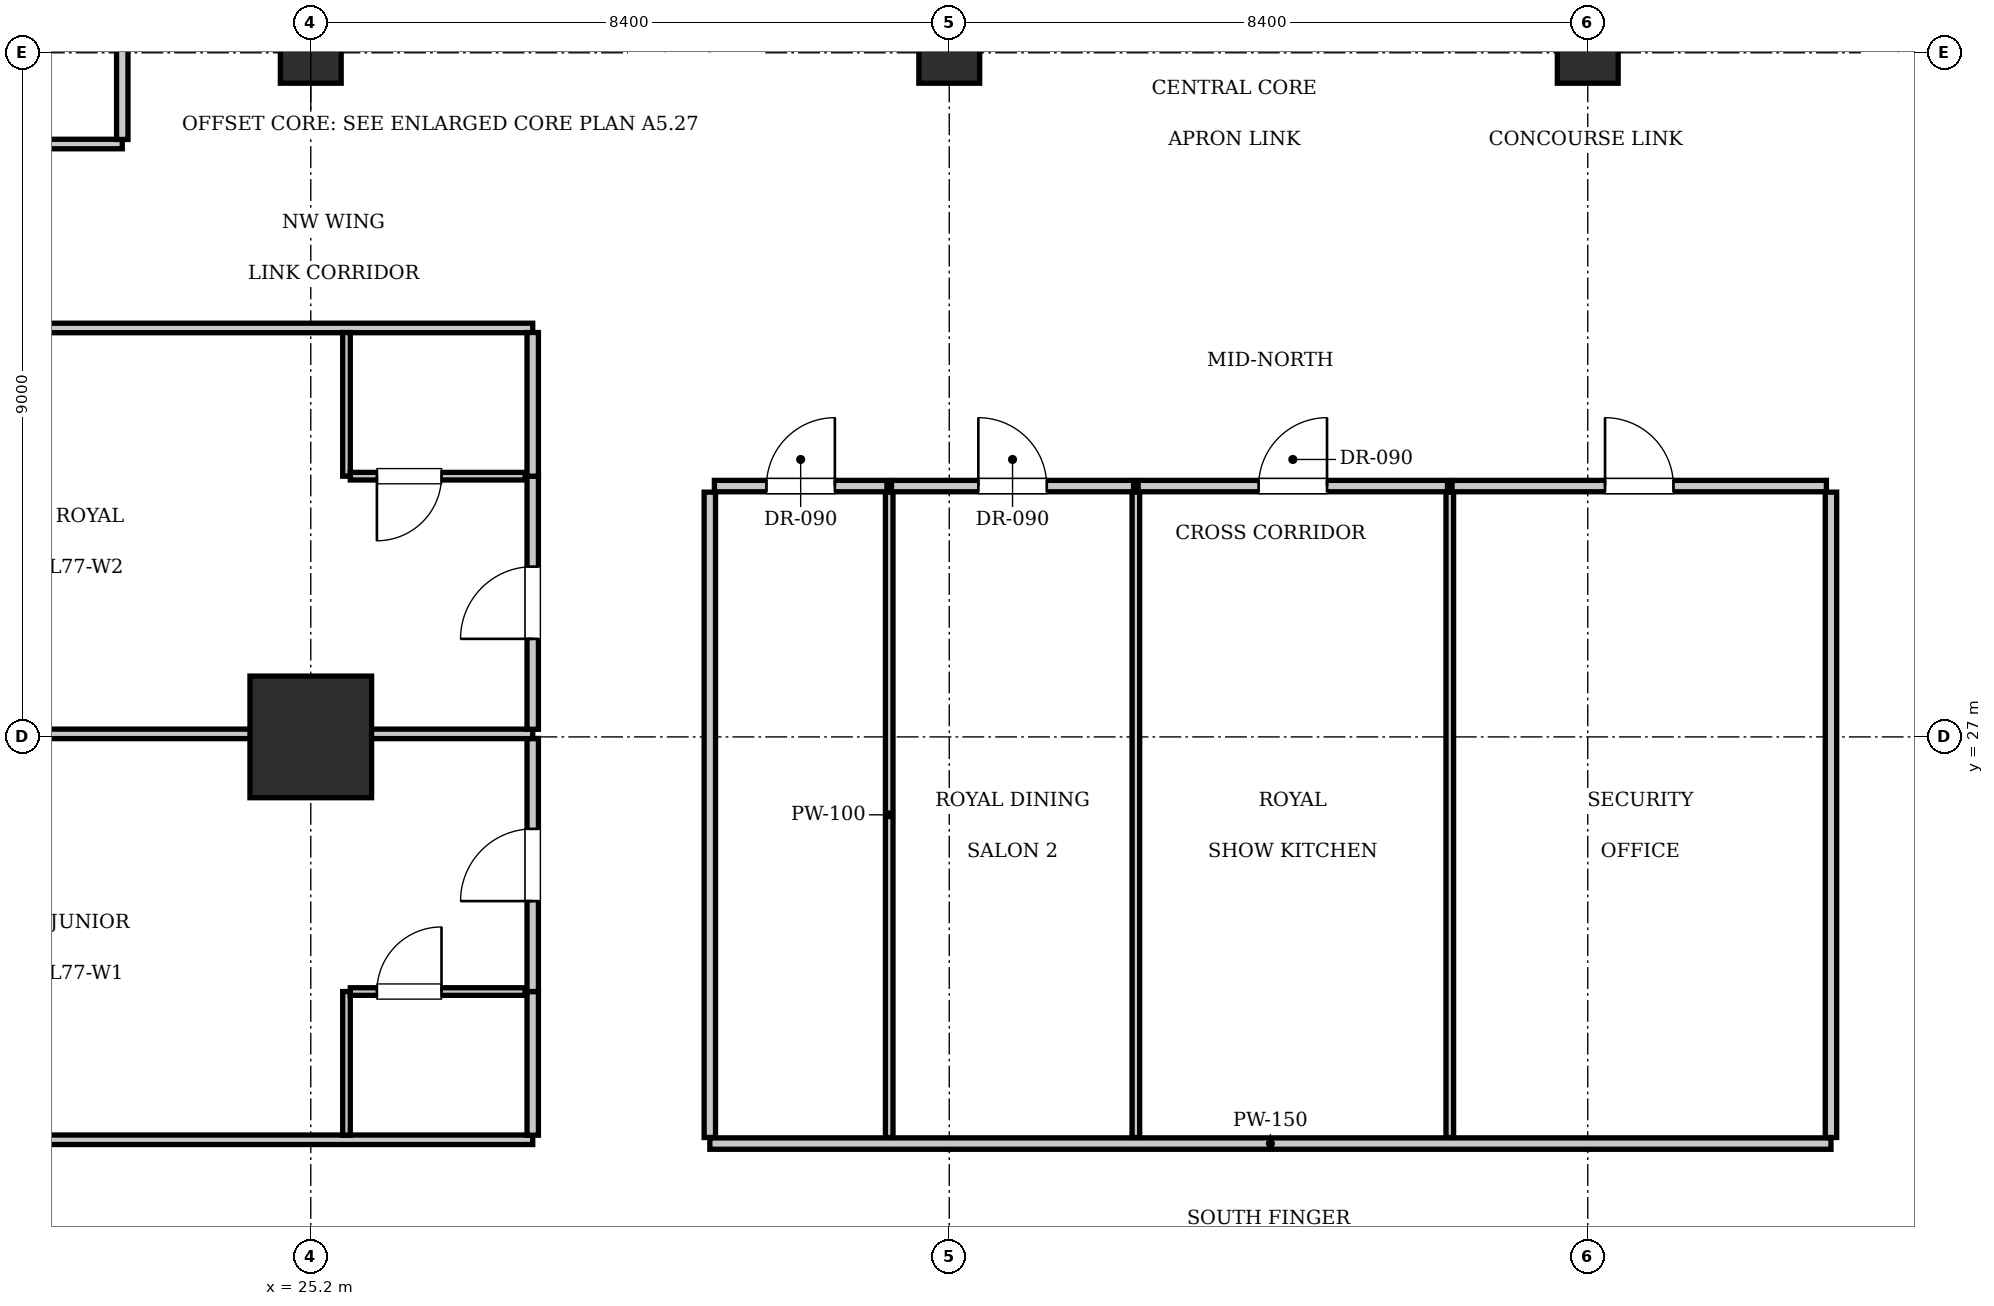
"""IFC4 building model, lengths in metres.
Left out: names, types, materials, properties, quantities, classifications, styles, units other than length and angle.
Written with IfcOpenShell. Run it as: python <this file> out.ifc"""

import sys

from ifc_helpers import new_model, si_unit, direction, frame, frame_2d, origin, origin_2d, place, context, subcontext, project, spatial, rectangle, extrude, element, fill, save


model = new_model("IFC4")
c1 = context("Model", 3, precision=1e-05, world=origin(), true_north=direction((0.0, 1.0)))
c2 = subcontext(c1, "Body", "Model", "MODEL_VIEW")
j1 = project(units=[si_unit("LENGTHUNIT", "METRE"), si_unit("PLANEANGLEUNIT", "RADIAN")], contexts=[c1])
p1 = place(None, origin())
s1 = spatial("IfcSite", under=j1, at=p1, CompositionType="ELEMENT")
p2 = place(p1, origin())
s2 = spatial("IfcBuilding", under=s1, at=p2, CompositionType="ELEMENT")
p3 = place(p2, frame((0.0, 0.0, 312.55)))
s3 = spatial("IfcBuildingStorey", under=s2, at=p3, CompositionType="ELEMENT", Elevation=312.55)
p4 = place(p3, frame((25.2, 27.0, 0.0), z_axis=(0.0, 0.0, 1.0), x_axis=(1.0, 0.0, 0.0)))
e1 = element("IfcColumn", 1, at=p4, inside=s3, PredefinedType="COLUMN", context=c2, shape_type="SweptSolid", body=[
    extrude(rectangle(XDim=1.6, YDim=1.6, at=origin_2d()), origin(), (0.0, 0.0, 1.0), 3.85),
])
for number, where, z_axis, x_axis in (
    (2, (25.2, 36.0, 0.0), (0.0, 0.0, 1.0), (1.0, 0.0, 0.0)),
    (3, (33.6, 36.0, 0.0), (0.0, 0.0, 1.0), (1.0, 0.0, 0.0)),
    (4, (42.0, 36.0, 0.0), (0.0, 0.0, 1.0), (1.0, 0.0, 0.0)),
):
    element("IfcColumn", number, at=place(p3, frame(where, z_axis=z_axis, x_axis=x_axis)), inside=s3, PredefinedType="COLUMN", context=c2, shape_type="SweptSolid", body=[
        extrude(rectangle(XDim=0.8, YDim=0.8, at=origin_2d()), origin(), (0.0, 0.0, 1.0), 3.85),
    ])
p5 = place(p3, frame((30.45, 21.65, 0.0), z_axis=(0.0, 0.0, 1.0), x_axis=(1.0, 0.0, 0.0)))
e5 = element("IfcWall", 5, at=p5, inside=s3, PredefinedType="PARTITIONING", context=c2, shape_type="SweptSolid", body=[
    extrude(rectangle(XDim=14.75, YDim=0.15, at=frame_2d((7.375, 0.0))), origin(), (0.0, 0.0, 1.0), 3.55),
])
for number, where, z_axis, x_axis in (
    (6, (30.45, 21.73, 0.0), (0.0, 0.0, 1.0), (0.0, 1.0, 0.0)),
    (7, (45.2, 21.73, 0.0), (0.0, 0.0, 1.0), (0.0, 1.0, 0.0)),
):
    element("IfcWall", number, at=place(p3, frame(where, z_axis=z_axis, x_axis=x_axis)), inside=s3, PredefinedType="PARTITIONING", context=c2, shape_type="SweptSolid", body=[
        extrude(rectangle(XDim=8.49, YDim=0.15, at=frame_2d((4.245, 0.0))), origin(), (0.0, 0.0, 1.0), 3.55),
    ])
p6 = place(p3, frame((30.51, 30.3, 0.0), z_axis=(0.0, 0.0, 1.0), x_axis=(1.0, 0.0, 0.0)))
e8 = element("IfcWall", 8, at=p6, inside=s3, PredefinedType="PARTITIONING", context=c2, shape_type="SweptSolid", body=[
    extrude(rectangle(XDim=2.27, YDim=0.15, at=frame_2d((1.135, 0.0))), origin(), (0.0, 0.0, 1.0), 3.55),
])
p7 = place(p6, frame((0.685, 0.0, 0.0)))
e9 = element("IfcOpeningElement", 9, at=p7, cuts=e8, PredefinedType="OPENING", context=c2, shape_type="SweptSolid", body=[
    extrude(rectangle(XDim=0.9, YDim=2.1, at=frame_2d((0.45, 1.05))), frame((0.0, 0.085, 0.0), z_axis=(0.0, -1.0, 0.0), x_axis=(1.0, 0.0, 0.0)), (0.0, 0.0, 1.0), 0.17),
])
p8 = place(p3, frame((32.81, 21.73, 0.0), z_axis=(0.0, 0.0, 1.0), x_axis=(0.0, 1.0, 0.0)))
e10 = element("IfcWall", 10, at=p8, inside=s3, PredefinedType="PARTITIONING", context=c2, shape_type="SweptSolid", body=[
    extrude(rectangle(XDim=8.49, YDim=0.1, at=frame_2d((4.245, 0.0))), origin(), (0.0, 0.0, 1.0), 3.55),
])
p9 = place(p3, frame((32.84, 30.3, 0.0), z_axis=(0.0, 0.0, 1.0), x_axis=(1.0, 0.0, 0.0)))
e11 = element("IfcWall", 11, at=p9, inside=s3, PredefinedType="PARTITIONING", context=c2, shape_type="SweptSolid", body=[
    extrude(rectangle(XDim=3.185, YDim=0.15, at=frame_2d((1.592, 0.0))), origin(), (0.0, 0.0, 1.0), 3.55),
])
p10 = place(p9, frame((1.143, 0.0, 0.0)))
e12 = element("IfcOpeningElement", 12, at=p10, cuts=e11, PredefinedType="OPENING", context=c2, shape_type="SweptSolid", body=[
    extrude(rectangle(XDim=0.9, YDim=2.1, at=frame_2d((0.45, 1.05))), frame((0.0, 0.085, 0.0), z_axis=(0.0, -1.0, 0.0), x_axis=(1.0, 0.0, 0.0)), (0.0, 0.0, 1.0), 0.17),
])
p11 = place(p3, frame((36.055, 21.73, 0.0), z_axis=(0.0, 0.0, 1.0), x_axis=(0.0, 1.0, 0.0)))
e13 = element("IfcWall", 13, at=p11, inside=s3, PredefinedType="PARTITIONING", context=c2, shape_type="SweptSolid", body=[
    extrude(rectangle(XDim=8.49, YDim=0.1, at=frame_2d((4.245, 0.0))), origin(), (0.0, 0.0, 1.0), 3.55),
])
p12 = place(p3, frame((36.085, 30.3, 0.0), z_axis=(0.0, 0.0, 1.0), x_axis=(1.0, 0.0, 0.0)))
e14 = element("IfcWall", 14, at=p12, inside=s3, PredefinedType="PARTITIONING", context=c2, shape_type="SweptSolid", body=[
    extrude(rectangle(XDim=4.07, YDim=0.15, at=frame_2d((2.035, 0.0))), origin(), (0.0, 0.0, 1.0), 3.55),
])
p13 = place(p12, frame((1.585, 0.0, 0.0)))
e15 = element("IfcOpeningElement", 15, at=p13, cuts=e14, PredefinedType="OPENING", context=c2, shape_type="SweptSolid", body=[
    extrude(rectangle(XDim=0.9, YDim=2.1, at=frame_2d((0.45, 1.05))), frame((0.0, 0.085, 0.0), z_axis=(0.0, -1.0, 0.0), x_axis=(1.0, 0.0, 0.0)), (0.0, 0.0, 1.0), 0.17),
])
p14 = place(p3, frame((40.185, 21.73, 0.0), z_axis=(0.0, 0.0, 1.0), x_axis=(0.0, 1.0, 0.0)))
e16 = element("IfcWall", 16, at=p14, inside=s3, PredefinedType="PARTITIONING", context=c2, shape_type="SweptSolid", body=[
    extrude(rectangle(XDim=8.49, YDim=0.1, at=frame_2d((4.245, 0.0))), origin(), (0.0, 0.0, 1.0), 3.55),
])
p15 = place(p3, frame((40.215, 30.3, 0.0), z_axis=(0.0, 0.0, 1.0), x_axis=(1.0, 0.0, 0.0)))
e17 = element("IfcWall", 17, at=p15, inside=s3, PredefinedType="PARTITIONING", context=c2, shape_type="SweptSolid", body=[
    extrude(rectangle(XDim=4.925, YDim=0.15, at=frame_2d((2.462, 0.0))), origin(), (0.0, 0.0, 1.0), 3.55),
])
p16 = place(p15, frame((2.012, 0.0, 0.0)))
e18 = element("IfcOpeningElement", 18, at=p16, cuts=e17, PredefinedType="OPENING", context=c2, shape_type="SweptSolid", body=[
    extrude(rectangle(XDim=0.9, YDim=2.1, at=frame_2d((0.45, 1.05))), frame((0.0, 0.085, 0.0), z_axis=(0.0, -1.0, 0.0), x_axis=(1.0, 0.0, 0.0)), (0.0, 0.0, 1.0), 0.17),
])
for number, where, z_axis, x_axis in (
    (19, (15.5, 21.7, 0.0), (0.0, 0.0, 1.0), (1.0, 0.0, 0.0)),
    (20, (15.5, 32.38, 0.0), (0.0, 0.0, 1.0), (1.0, 0.0, 0.0)),
):
    element("IfcWall", number, at=place(p3, frame(where, z_axis=z_axis, x_axis=x_axis)), inside=s3, PredefinedType="PARTITIONING", context=c2, shape_type="SweptSolid", body=[
        extrude(rectangle(XDim=12.62, YDim=0.125, at=frame_2d((6.31, 0.0))), origin(), (0.0, 0.0, 1.0), 3.55),
    ])
p17 = place(p3, frame((28.12, 21.76, 0.0), z_axis=(0.0, 0.0, 1.0), x_axis=(0.0, 1.0, 0.0)))
e21 = element("IfcWall", 21, at=p17, inside=s3, PredefinedType="PARTITIONING", context=c2, shape_type="SweptSolid", body=[
    extrude(rectangle(XDim=1.89, YDim=0.15, at=frame_2d((0.945, 0.0))), origin(), (0.0, 0.0, 1.0), 3.55),
])
p18 = place(p3, frame((28.12, 23.65, 0.0), z_axis=(0.0, 0.0, 1.0), x_axis=(0.0, 1.0, 0.0)))
e22 = element("IfcWall", 22, at=p18, inside=s3, PredefinedType="PARTITIONING", context=c2, shape_type="SweptSolid", body=[
    extrude(rectangle(XDim=3.33, YDim=0.15, at=frame_2d((1.665, 0.0))), origin(), (0.0, 0.0, 1.0), 3.55),
])
p19 = place(p18, frame((1.19, 0.0, 0.0)))
e23 = element("IfcOpeningElement", 23, at=p19, cuts=e22, PredefinedType="OPENING", context=c2, shape_type="SweptSolid", body=[
    extrude(rectangle(XDim=0.95, YDim=2.15, at=frame_2d((0.475, 1.075))), frame((0.0, 0.085, 0.0), z_axis=(0.0, -1.0, 0.0), x_axis=(1.0, 0.0, 0.0)), (0.0, 0.0, 1.0), 0.17),
])
p20 = place(p3, frame((25.67, 21.76, 0.0), z_axis=(0.0, 0.0, 1.0), x_axis=(0.0, 1.0, 0.0)))
e24 = element("IfcWall", 24, at=p20, inside=s3, PredefinedType="PARTITIONING", context=c2, shape_type="SweptSolid", body=[
    extrude(rectangle(XDim=1.89, YDim=0.1, at=frame_2d((0.945, 0.0))), origin(), (0.0, 0.0, 1.0), 3.55),
])
p21 = place(p3, frame((25.72, 23.65, 0.0), z_axis=(0.0, 0.0, 1.0), x_axis=(1.0, 0.0, 0.0)))
e25 = element("IfcWall", 25, at=p21, inside=s3, PredefinedType="PARTITIONING", context=c2, shape_type="SweptSolid", body=[
    extrude(rectangle(XDim=2.3, YDim=0.1, at=frame_2d((1.15, 0.0))), origin(), (0.0, 0.0, 1.0), 3.55),
])
p22 = place(p21, frame((0.35, 0.0, 0.0)))
e26 = element("IfcOpeningElement", 26, at=p22, cuts=e25, PredefinedType="OPENING", context=c2, shape_type="SweptSolid", body=[
    extrude(rectangle(XDim=0.85, YDim=2.1, at=frame_2d((0.425, 1.05))), frame((0.0, 0.06, 0.0), z_axis=(0.0, -1.0, 0.0), x_axis=(1.0, 0.0, 0.0)), (0.0, 0.0, 1.0), 0.12),
])
p23 = place(p3, frame((15.5, 27.04, 0.0), z_axis=(0.0, 0.0, 1.0), x_axis=(1.0, 0.0, 0.0)))
e27 = element("IfcWall", 27, at=p23, inside=s3, PredefinedType="PARTITIONING", context=c2, shape_type="SweptSolid", body=[
    extrude(rectangle(XDim=12.62, YDim=0.125, at=frame_2d((6.31, 0.0))), origin(), (0.0, 0.0, 1.0), 2.35),
])
p24 = place(p3, frame((28.12, 27.1, 0.0), z_axis=(0.0, 0.0, 1.0), x_axis=(0.0, 1.0, 0.0)))
e28 = element("IfcWall", 28, at=p24, inside=s3, PredefinedType="PARTITIONING", context=c2, shape_type="SweptSolid", body=[
    extrude(rectangle(XDim=3.33, YDim=0.15, at=frame_2d((1.665, 0.0))), origin(), (0.0, 0.0, 1.0), 3.55),
])
p25 = place(p24, frame((1.19, 0.0, 0.0)))
e29 = element("IfcOpeningElement", 29, at=p25, cuts=e28, PredefinedType="OPENING", context=c2, shape_type="SweptSolid", body=[
    extrude(rectangle(XDim=0.95, YDim=2.15, at=frame_2d((0.475, 1.075))), frame((0.0, 0.085, 0.0), z_axis=(0.0, -1.0, 0.0), x_axis=(1.0, 0.0, 0.0)), (0.0, 0.0, 1.0), 0.17),
])
p26 = place(p3, frame((28.12, 30.43, 0.0), z_axis=(0.0, 0.0, 1.0), x_axis=(0.0, 1.0, 0.0)))
e30 = element("IfcWall", 30, at=p26, inside=s3, PredefinedType="PARTITIONING", context=c2, shape_type="SweptSolid", body=[
    extrude(rectangle(XDim=1.89, YDim=0.15, at=frame_2d((0.945, 0.0))), origin(), (0.0, 0.0, 1.0), 3.55),
])
p27 = place(p3, frame((25.67, 30.43, 0.0), z_axis=(0.0, 0.0, 1.0), x_axis=(0.0, 1.0, 0.0)))
e31 = element("IfcWall", 31, at=p27, inside=s3, PredefinedType="PARTITIONING", context=c2, shape_type="SweptSolid", body=[
    extrude(rectangle(XDim=1.89, YDim=0.1, at=frame_2d((0.945, 0.0))), origin(), (0.0, 0.0, 1.0), 3.55),
])
p28 = place(p3, frame((25.72, 30.43, 0.0), z_axis=(0.0, 0.0, 1.0), x_axis=(1.0, 0.0, 0.0)))
e32 = element("IfcWall", 32, at=p28, inside=s3, PredefinedType="PARTITIONING", context=c2, shape_type="SweptSolid", body=[
    extrude(rectangle(XDim=2.3, YDim=0.1, at=frame_2d((1.15, 0.0))), origin(), (0.0, 0.0, 1.0), 3.55),
])
p29 = place(p28, frame((0.35, 0.0, 0.0)))
e33 = element("IfcOpeningElement", 33, at=p29, cuts=e32, PredefinedType="OPENING", context=c2, shape_type="SweptSolid", body=[
    extrude(rectangle(XDim=0.85, YDim=2.1, at=frame_2d((0.425, 1.05))), frame((0.0, 0.06, 0.0), z_axis=(0.0, -1.0, 0.0), x_axis=(1.0, 0.0, 0.0)), (0.0, 0.0, 1.0), 0.12),
])
p30 = place(p3, frame((15.5, 34.8, 0.0), z_axis=(0.0, 0.0, 1.0), x_axis=(1.0, 0.0, 0.0)))
e34 = element("IfcWall", 34, at=p30, inside=s3, PredefinedType="PARTITIONING", context=c2, shape_type="SweptSolid", body=[
    extrude(rectangle(XDim=7.22, YDim=0.125, at=frame_2d((3.61, 0.0))), origin(), (0.0, 0.0, 1.0), 3.55),
])
p31 = place(p3, frame((22.72, 34.86, 0.0), z_axis=(0.0, 0.0, 1.0), x_axis=(0.0, 1.0, 0.0)))
e35 = element("IfcWall", 35, at=p31, inside=s3, PredefinedType="PARTITIONING", context=c2, shape_type="SweptSolid", body=[
    extrude(rectangle(XDim=11.527, YDim=0.15, at=frame_2d((5.764, 0.0))), origin(), (0.0, 0.0, 1.0), 3.55),
])
p32 = place(p31, frame((5.289, 0.0, 0.0)))
e36 = element("IfcOpeningElement", 36, at=p32, cuts=e35, PredefinedType="OPENING", context=c2, shape_type="SweptSolid", body=[
    extrude(rectangle(XDim=0.95, YDim=2.15, at=frame_2d((0.475, 1.075))), frame((0.0, 0.085, 0.0), z_axis=(0.0, -1.0, 0.0), x_axis=(1.0, 0.0, 0.0)), (0.0, 0.0, 1.0), 0.17),
])
p33 = place(p7, origin())
e37 = element("IfcDoor", 37, at=p33, inside=s3, OperationType="SINGLE_SWING_RIGHT", PredefinedType="DOOR", context=c2, shape_type="SweptSolid", body=[
    extrude(rectangle(XDim=0.9, YDim=2.1, at=frame_2d((0.45, 1.05))), frame((0.0, 0.025, 0.0), z_axis=(0.0, -1.0, 0.0), x_axis=(1.0, 0.0, 0.0)), (0.0, 0.0, 1.0), 0.05),
])
fill(e9, e37)
p34 = place(p10, origin())
e38 = element("IfcDoor", 38, at=p34, inside=s3, OperationType="SINGLE_SWING_LEFT", PredefinedType="DOOR", context=c2, shape_type="SweptSolid", body=[
    extrude(rectangle(XDim=0.9, YDim=2.1, at=frame_2d((0.45, 1.05))), frame((0.0, 0.025, 0.0), z_axis=(0.0, -1.0, 0.0), x_axis=(1.0, 0.0, 0.0)), (0.0, 0.0, 1.0), 0.05),
])
fill(e12, e38)
p35 = place(p13, origin())
e39 = element("IfcDoor", 39, at=p35, inside=s3, OperationType="SINGLE_SWING_RIGHT", PredefinedType="DOOR", context=c2, shape_type="SweptSolid", body=[
    extrude(rectangle(XDim=0.9, YDim=2.1, at=frame_2d((0.45, 1.05))), frame((0.0, 0.025, 0.0), z_axis=(0.0, -1.0, 0.0), x_axis=(1.0, 0.0, 0.0)), (0.0, 0.0, 1.0), 0.05),
])
fill(e15, e39)
p36 = place(p16, origin())
e40 = element("IfcDoor", 40, at=p36, inside=s3, OperationType="SINGLE_SWING_LEFT", PredefinedType="DOOR", context=c2, shape_type="SweptSolid", body=[
    extrude(rectangle(XDim=0.9, YDim=2.1, at=frame_2d((0.45, 1.05))), frame((0.0, 0.025, 0.0), z_axis=(0.0, -1.0, 0.0), x_axis=(1.0, 0.0, 0.0)), (0.0, 0.0, 1.0), 0.05),
])
fill(e18, e40)
p37 = place(p22, origin())
e41 = element("IfcDoor", 41, at=p37, inside=s3, OperationType="SINGLE_SWING_RIGHT", PredefinedType="DOOR", context=c2, shape_type="SweptSolid", body=[
    extrude(rectangle(XDim=0.85, YDim=2.1, at=frame_2d((0.425, 1.05))), frame((0.0, 0.025, 0.0), z_axis=(0.0, -1.0, 0.0), x_axis=(1.0, 0.0, 0.0)), (0.0, 0.0, 1.0), 0.05),
])
fill(e26, e41)
p38 = place(p19, origin())
e42 = element("IfcDoor", 42, at=p38, inside=s3, OperationType="SINGLE_SWING_LEFT", PredefinedType="DOOR", context=c2, shape_type="SweptSolid", body=[
    extrude(rectangle(XDim=0.95, YDim=2.15, at=frame_2d((0.475, 1.075))), frame((0.0, 0.025, 0.0), z_axis=(0.0, -1.0, 0.0), x_axis=(1.0, 0.0, 0.0)), (0.0, 0.0, 1.0), 0.05),
])
fill(e23, e42)
p39 = place(p29, frame((0.85, 0.0, 0.0), z_axis=(0.0, 0.0, 1.0), x_axis=(-1.0, 0.0, 0.0)))
e43 = element("IfcDoor", 43, at=p39, inside=s3, OperationType="SINGLE_SWING_RIGHT", PredefinedType="DOOR", context=c2, shape_type="SweptSolid", body=[
    extrude(rectangle(XDim=0.85, YDim=2.1, at=frame_2d((0.425, 1.05))), frame((0.0, 0.025, 0.0), z_axis=(0.0, -1.0, 0.0), x_axis=(1.0, 0.0, 0.0)), (0.0, 0.0, 1.0), 0.05),
])
fill(e33, e43)
p40 = place(p25, origin())
e44 = element("IfcDoor", 44, at=p40, inside=s3, OperationType="SINGLE_SWING_LEFT", PredefinedType="DOOR", context=c2, shape_type="SweptSolid", body=[
    extrude(rectangle(XDim=0.95, YDim=2.15, at=frame_2d((0.475, 1.075))), frame((0.0, 0.025, 0.0), z_axis=(0.0, -1.0, 0.0), x_axis=(1.0, 0.0, 0.0)), (0.0, 0.0, 1.0), 0.05),
])
fill(e29, e44)
save(model, sys.argv[1])
